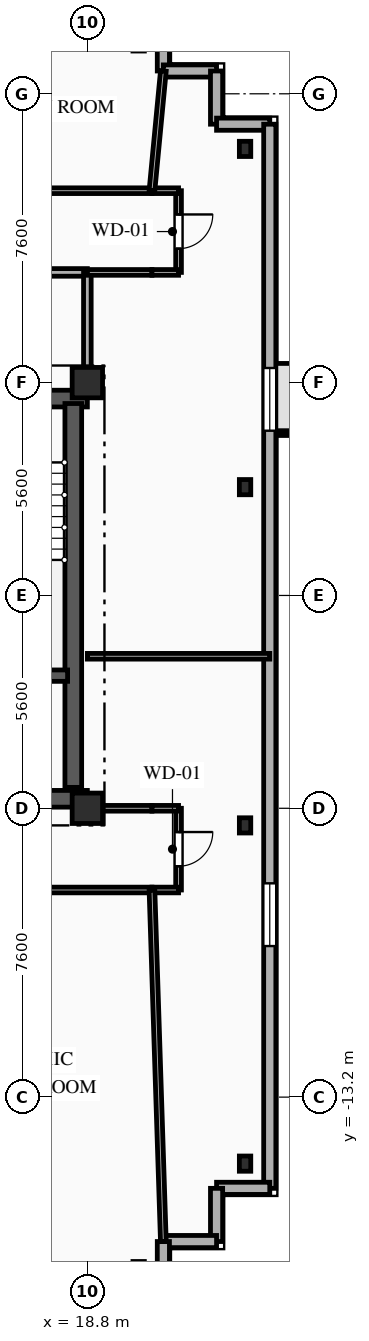
"""IFC4 building model, lengths in metres.
Left out: names, types, materials, properties, quantities, classifications, styles, units other than length and angle.
Written with IfcOpenShell. Run it as: python <this file> out.ifc"""

import sys

from ifc_helpers import new_model, si_unit, direction, frame, frame_2d, origin, origin_2d, place, context, subcontext, project, spatial, rectangle, i_section, extrude, element, fill, save


model = new_model("IFC4")
c1 = context("Model", 3, precision=1e-05, world=origin(), true_north=direction((0.0, 1.0)))
c2 = subcontext(c1, "Body", "Model", "MODEL_VIEW")
j1 = project(units=[si_unit("LENGTHUNIT", "METRE"), si_unit("PLANEANGLEUNIT", "RADIAN")], contexts=[c1])
p1 = place(None, origin())
s1 = spatial("IfcSite", under=j1, at=p1, CompositionType="ELEMENT")
p2 = place(p1, origin())
s2 = spatial("IfcBuilding", under=s1, at=p2, CompositionType="ELEMENT")
p3 = place(p2, frame((0.0, 0.0, 238.35)))
s3 = spatial("IfcBuildingStorey", under=s2, at=p3, CompositionType="ELEMENT", Elevation=238.35)
for number, where, z_axis, x_axis in (
    (1, (18.8, -5.6, 0.0), (0.0, 0.0, 1.0), (1.0, 0.0, 0.0)),
    (2, (18.8, 5.6, 0.0), (0.0, 0.0, 1.0), (1.0, 0.0, 0.0)),
):
    element("IfcColumn", number, at=place(p3, frame(where, z_axis=z_axis, x_axis=x_axis)), inside=s3, PredefinedType="COLUMN", context=c2, shape_type="SweptSolid", body=[
        extrude(rectangle(XDim=0.8, YDim=0.8, at=origin_2d()), origin(), (0.0, 0.0, 1.0), 3.35),
    ])
for number, where, z_axis, x_axis in (
    (3, (22.95, -14.95, 0.0), (0.0, 0.0, 1.0), (1.0, 0.0, 0.0)),
    (4, (22.95, -6.05, 0.0), (0.0, 0.0, 1.0), (1.0, 0.0, 0.0)),
    (5, (22.95, 2.85, 0.0), (0.0, 0.0, 1.0), (1.0, 0.0, 0.0)),
    (6, (22.95, 11.75, 0.0), (0.0, 0.0, 1.0), (1.0, 0.0, 0.0)),
):
    element("IfcColumn", number, at=place(p3, frame(where, z_axis=z_axis, x_axis=x_axis)), inside=s3, PredefinedType="COLUMN", context=c2, shape_type="SweptSolid", body=[
        extrude(i_section(OverallWidth=0.3, OverallDepth=0.4, WebThickness=0.013, FlangeThickness=0.024, FilletRadius=0.027, at=origin_2d()), origin(), (0.0, 0.0, 1.0), 3.35),
    ])
for number, where, z_axis, x_axis in (
    (7, (20.8, 15.2, 0.0), (0.0, 0.0, 1.0), (0.0, -1.0, 0.0)),
    (8, (20.8, 13.8, 0.0), (0.0, 0.0, 1.0), (1.0, 0.0, 0.0)),
):
    element("IfcWall", number, at=place(p3, frame(where, z_axis=z_axis, x_axis=x_axis)), inside=s3, PredefinedType="SOLIDWALL", context=c2, shape_type="SweptSolid", body=[
        extrude(rectangle(XDim=1.4, YDim=0.32, at=frame_2d((0.7, 0.0))), origin(), (0.0, 0.0, 1.0), 3.04),
    ])
for number, where, z_axis, x_axis in (
    (9, (22.2, 13.8, 0.0), (0.0, 0.0, 1.0), (0.0, -1.0, 0.0)),
    (10, (22.2, 12.4, 0.0), (0.0, 0.0, 1.0), (1.0, 0.0, 0.0)),
):
    element("IfcWall", number, at=place(p3, frame(where, z_axis=z_axis, x_axis=x_axis)), inside=s3, PredefinedType="SOLIDWALL", context=c2, shape_type="SweptSolid", body=[
        extrude(rectangle(XDim=1.4, YDim=0.32, at=frame_2d((0.7, 0.0))), origin(), (0.0, 0.0, 1.0), 3.04),
    ])
p4 = place(p3, frame((23.6, 12.4, 0.0), z_axis=(0.0, 0.0, 1.0), x_axis=(0.0, -1.0, 0.0)))
e11 = element("IfcWall", 11, at=p4, inside=s3, PredefinedType="SOLIDWALL", context=c2, shape_type="SweptSolid", body=[
    extrude(rectangle(XDim=28.0, YDim=0.32, at=frame_2d((14.0, 0.0))), origin(), (0.0, 0.0, 1.0), 3.04),
])
p5 = place(p4, frame((6.415, 0.0, 0.85)))
e12 = element("IfcOpeningElement", 12, at=p5, cuts=e11, PredefinedType="OPENING", context=c2, shape_type="SweptSolid", body=[
    extrude(rectangle(XDim=1.65, YDim=1.85, at=frame_2d((0.825, 0.925))), frame((0.0, 0.17, 0.0), z_axis=(0.0, -1.0, 0.0), x_axis=(1.0, 0.0, 0.0)), (0.0, 0.0, 1.0), 0.34),
])
p6 = place(p4, frame((19.975, 0.0, 0.85)))
e13 = element("IfcOpeningElement", 13, at=p6, cuts=e11, PredefinedType="OPENING", context=c2, shape_type="SweptSolid", body=[
    extrude(rectangle(XDim=1.65, YDim=1.85, at=frame_2d((0.825, 0.925))), frame((0.0, 0.17, 0.0), z_axis=(0.0, -1.0, 0.0), x_axis=(1.0, 0.0, 0.0)), (0.0, 0.0, 1.0), 0.34),
])
p7 = place(p3, frame((23.6, -15.6, 0.0), z_axis=(0.0, 0.0, 1.0), x_axis=(-1.0, 0.0, 0.0)))
e14 = element("IfcWall", 14, at=p7, inside=s3, PredefinedType="SOLIDWALL", context=c2, shape_type="SweptSolid", body=[
    extrude(rectangle(XDim=1.4, YDim=0.32, at=frame_2d((0.7, 0.0))), origin(), (0.0, 0.0, 1.0), 3.04),
])
for number, where, z_axis, x_axis in (
    (15, (22.2, -15.6, 0.0), (0.0, 0.0, 1.0), (0.0, -1.0, 0.0)),
    (16, (22.2, -17.0, 0.0), (0.0, 0.0, 1.0), (-1.0, 0.0, 0.0)),
    (17, (20.8, -17.0, 0.0), (0.0, 0.0, 1.0), (0.0, -1.0, 0.0)),
):
    element("IfcWall", number, at=place(p3, frame(where, z_axis=z_axis, x_axis=x_axis)), inside=s3, PredefinedType="SOLIDWALL", context=c2, shape_type="SweptSolid", body=[
        extrude(rectangle(XDim=1.4, YDim=0.32, at=frame_2d((0.7, 0.0))), origin(), (0.0, 0.0, 1.0), 3.04),
    ])
p8 = place(p3, frame((9.2, 5.18, 0.0), z_axis=(0.0, 0.0, 1.0), x_axis=(1.0, 0.0, 0.0)))
e18 = element("IfcWall", 18, at=p8, inside=s3, PredefinedType="SHEAR", context=c2, shape_type="SweptSolid", body=[
    extrude(rectangle(XDim=9.6, YDim=0.44, at=frame_2d((4.8, 0.0))), origin(), (0.0, 0.0, 1.0), 3.04),
])
p9 = place(p8, frame((6.95, 0.0, 0.0)))
e19 = element("IfcOpeningElement", 19, at=p9, cuts=e18, PredefinedType="OPENING", context=c2, shape_type="SweptSolid", body=[
    extrude(rectangle(XDim=1.1, YDim=2.15, at=frame_2d((0.55, 1.075))), frame((0.0, 0.23, 0.0), z_axis=(0.0, -1.0, 0.0), x_axis=(1.0, 0.0, 0.0)), (0.0, 0.0, 1.0), 0.46),
])
p10 = place(p8, frame((3.775, 0.0, 0.0)))
e20 = element("IfcOpeningElement", 20, at=p10, cuts=e18, PredefinedType="OPENING", context=c2, shape_type="SweptSolid", body=[
    extrude(rectangle(XDim=1.05, YDim=2.1, at=frame_2d((0.525, 1.05))), frame((0.0, 0.23, 0.0), z_axis=(0.0, -1.0, 0.0), x_axis=(1.0, 0.0, 0.0)), (0.0, 0.0, 1.0), 0.46),
])
p11 = place(p3, frame((9.2, -5.35, 0.0), z_axis=(0.0, 0.0, 1.0), x_axis=(1.0, 0.0, 0.0)))
e21 = element("IfcWall", 21, at=p11, inside=s3, PredefinedType="SHEAR", context=c2, shape_type="SweptSolid", body=[
    extrude(rectangle(XDim=9.6, YDim=0.44, at=frame_2d((4.8, 0.0))), origin(), (0.0, 0.0, 1.0), 3.04),
])
p12 = place(p11, frame((7.65, 0.0, 0.0)))
e22 = element("IfcOpeningElement", 22, at=p12, cuts=e21, PredefinedType="OPENING", context=c2, shape_type="SweptSolid", body=[
    extrude(rectangle(XDim=0.9, YDim=2.1, at=frame_2d((0.45, 1.05))), frame((0.0, 0.23, 0.0), z_axis=(0.0, -1.0, 0.0), x_axis=(1.0, 0.0, 0.0)), (0.0, 0.0, 1.0), 0.46),
])
p13 = place(p3, frame((18.43, -5.05, 0.0), z_axis=(0.0, 0.0, 1.0), x_axis=(0.0, 1.0, 0.0)))
e23 = element("IfcWall", 23, at=p13, inside=s3, PredefinedType="SHEAR", context=c2, shape_type="SweptSolid", body=[
    extrude(rectangle(XDim=10.1, YDim=0.44, at=frame_2d((5.05, 0.0))), origin(), (0.0, 0.0, 1.0), 3.04),
])
p14 = place(p3, frame((15.1, -2.11, 0.0), z_axis=(0.0, 0.0, 1.0), x_axis=(1.0, 0.0, 0.0)))
e24 = element("IfcWall", 24, at=p14, inside=s3, PredefinedType="SHEAR", context=c2, shape_type="SweptSolid", body=[
    extrude(rectangle(XDim=3.18, YDim=0.3, at=frame_2d((1.59, 0.0))), origin(), (0.0, 0.0, 1.0), 3.04),
])
p15 = place(p3, frame((18.8, 8.5, 0.0), z_axis=(0.0, 0.0, 1.0), x_axis=(-1.0, 0.0, 0.0)))
e25 = element("IfcWall", 25, at=p15, inside=s3, PredefinedType="PARTITIONING", context=c2, shape_type="SweptSolid", body=[
    extrude(rectangle(XDim=6.8, YDim=0.2, at=frame_2d((3.4, 0.0))), origin(), (0.0, 0.0, 1.0), 3.04),
])
p16 = place(p15, frame((3.985, 0.0, 0.0)))
e26 = element("IfcOpeningElement", 26, at=p16, cuts=e25, PredefinedType="OPENING", context=c2, shape_type="SweptSolid", body=[
    extrude(rectangle(XDim=1.1, YDim=2.15, at=frame_2d((0.55, 1.075))), frame((0.0, 0.11, 0.0), z_axis=(0.0, -1.0, 0.0), x_axis=(1.0, 0.0, 0.0)), (0.0, 0.0, 1.0), 0.22),
])
p17 = place(p3, frame((18.8, 5.6, 0.0), z_axis=(0.0, 0.0, 1.0), x_axis=(0.0, 1.0, 0.0)))
e27 = element("IfcWall", 27, at=p17, inside=s3, PredefinedType="PARTITIONING", context=c2, shape_type="SweptSolid", body=[
    extrude(rectangle(XDim=2.9, YDim=0.2, at=frame_2d((1.45, 0.0))), origin(), (0.0, 0.0, 1.0), 2.665),
])
p18 = place(p3, frame((21.2, 10.65, 0.0), z_axis=(0.0, 0.0, 1.0), x_axis=(0.0, -1.0, 0.0)))
e28 = element("IfcWall", 28, at=p18, inside=s3, PredefinedType="PARTITIONING", context=c2, shape_type="SweptSolid", body=[
    extrude(rectangle(XDim=2.15, YDim=0.15, at=frame_2d((1.075, 0.0))), origin(), (0.0, 0.0, 1.0), 3.04),
])
p19 = place(p18, frame((0.625, 0.0, 0.0)))
e29 = element("IfcOpeningElement", 29, at=p19, cuts=e28, PredefinedType="OPENING", context=c2, shape_type="SweptSolid", body=[
    extrude(rectangle(XDim=0.9, YDim=2.1, at=frame_2d((0.45, 1.05))), frame((0.0, 0.085, 0.0), z_axis=(0.0, -1.0, 0.0), x_axis=(1.0, 0.0, 0.0)), (0.0, 0.0, 1.0), 0.17),
])
p20 = place(p3, frame((20.5, 8.5, 0.0), z_axis=(0.0, 0.0, 1.0), x_axis=(-1.0, 0.0, 0.0)))
e30 = element("IfcWall", 30, at=p20, inside=s3, PredefinedType="PARTITIONING", context=c2, shape_type="SweptSolid", body=[
    extrude(rectangle(XDim=1.7, YDim=0.15, at=frame_2d((0.85, 0.0))), origin(), (0.0, 0.0, 1.0), 3.04),
])
for number, where, z_axis, x_axis in (
    (31, (20.5, 10.65, 0.0), (0.0, 0.0, 1.0), (1.0, 0.0, 0.0)),
    (32, (21.2, 8.5, 0.0), (0.0, 0.0, 1.0), (-1.0, 0.0, 0.0)),
):
    element("IfcWall", number, at=place(p3, frame(where, z_axis=z_axis, x_axis=x_axis)), inside=s3, PredefinedType="PARTITIONING", context=c2, shape_type="SweptSolid", body=[
        extrude(rectangle(XDim=0.7, YDim=0.15, at=frame_2d((0.35, 0.0))), origin(), (0.0, 0.0, 1.0), 3.04),
    ])
p21 = place(p3, frame((10.25, 10.65, 0.0), z_axis=(0.0, 0.0, 1.0), x_axis=(1.0, 0.0, 0.0)))
e33 = element("IfcWall", 33, at=p21, inside=s3, PredefinedType="PARTITIONING", context=c2, shape_type="SweptSolid", body=[
    extrude(rectangle(XDim=10.25, YDim=0.15, at=frame_2d((5.125, 0.0))), origin(), (0.0, 0.0, 1.0), 3.04),
])
p22 = place(p21, frame((5.605, 0.0, 0.0)))
e34 = element("IfcOpeningElement", 34, at=p22, cuts=e33, PredefinedType="OPENING", context=c2, shape_type="SweptSolid", body=[
    extrude(rectangle(XDim=1.05, YDim=2.15, at=frame_2d((0.525, 1.075))), frame((0.0, 0.085, 0.0), z_axis=(0.0, -1.0, 0.0), x_axis=(1.0, 0.0, 0.0)), (0.0, 0.0, 1.0), 0.17),
])
p23 = place(p3, frame((21.2, -5.6, 0.0), z_axis=(0.0, 0.0, 1.0), x_axis=(0.0, -1.0, 0.0)))
e35 = element("IfcWall", 35, at=p23, inside=s3, PredefinedType="PARTITIONING", context=c2, shape_type="SweptSolid", body=[
    extrude(rectangle(XDim=2.15, YDim=0.15, at=frame_2d((1.075, 0.0))), origin(), (0.0, 0.0, 1.0), 3.04),
])
p24 = place(p23, frame((0.625, 0.0, 0.0)))
e36 = element("IfcOpeningElement", 36, at=p24, cuts=e35, PredefinedType="OPENING", context=c2, shape_type="SweptSolid", body=[
    extrude(rectangle(XDim=0.9, YDim=2.1, at=frame_2d((0.45, 1.05))), frame((0.0, 0.085, 0.0), z_axis=(0.0, -1.0, 0.0), x_axis=(1.0, 0.0, 0.0)), (0.0, 0.0, 1.0), 0.17),
])
p25 = place(p3, frame((18.8, -5.6, 0.0), z_axis=(0.0, 0.0, 1.0), x_axis=(1.0, 0.0, 0.0)))
e37 = element("IfcWall", 37, at=p25, inside=s3, PredefinedType="PARTITIONING", context=c2, shape_type="SweptSolid", body=[
    extrude(rectangle(XDim=1.7, YDim=0.15, at=frame_2d((0.85, 0.0))), origin(), (0.0, 0.0, 1.0), 3.04),
])
for number, where, z_axis, x_axis in (
    (38, (20.5, -5.6, 0.0), (0.0, 0.0, 1.0), (1.0, 0.0, 0.0)),
    (39, (21.2, -7.75, 0.0), (0.0, 0.0, 1.0), (-1.0, 0.0, 0.0)),
):
    element("IfcWall", number, at=place(p3, frame(where, z_axis=z_axis, x_axis=x_axis)), inside=s3, PredefinedType="PARTITIONING", context=c2, shape_type="SweptSolid", body=[
        extrude(rectangle(XDim=0.7, YDim=0.15, at=frame_2d((0.35, 0.0))), origin(), (0.0, 0.0, 1.0), 3.04),
    ])
p26 = place(p3, frame((20.5, -7.75, 0.0), z_axis=(0.0, 0.0, 1.0), x_axis=(-1.0, 0.0, 0.0)))
e40 = element("IfcWall", 40, at=p26, inside=s3, PredefinedType="PARTITIONING", context=c2, shape_type="SweptSolid", body=[
    extrude(rectangle(XDim=6.833, YDim=0.15, at=frame_2d((3.417, 0.0))), origin(), (0.0, 0.0, 1.0), 3.04),
])
p27 = place(p26, frame((4.625, 0.0, 0.0)))
e41 = element("IfcOpeningElement", 41, at=p27, cuts=e40, PredefinedType="OPENING", context=c2, shape_type="SweptSolid", body=[
    extrude(rectangle(XDim=1.05, YDim=2.15, at=frame_2d((0.525, 1.075))), frame((0.0, 0.085, 0.0), z_axis=(0.0, -1.0, 0.0), x_axis=(1.0, 0.0, 0.0)), (0.0, 0.0, 1.0), 0.17),
])
p28 = place(p3, frame((18.8, -1.6, 0.0), z_axis=(0.0, 0.0, 1.0), x_axis=(1.0, 0.0, 0.0)))
e42 = element("IfcWall", 42, at=p28, inside=s3, PredefinedType="PARTITIONING", context=c2, shape_type="SweptSolid", body=[
    extrude(rectangle(XDim=4.8, YDim=0.15, at=frame_2d((2.4, 0.0))), origin(), (0.0, 0.0, 1.0), 3.04),
])
p29 = place(p3, frame((20.8, -17.0, 0.0), z_axis=(0.0, 0.0, 1.0), x_axis=(-0.032420659042, 0.99947431226, 0.0)))
e43 = element("IfcWall", 43, at=p29, inside=s3, PredefinedType="PARTITIONING", context=c2, shape_type="SweptSolid", body=[
    extrude(rectangle(XDim=9.255, YDim=0.15, at=frame_2d((4.627, 0.0))), origin(), (0.0, 0.0, 1.0), 3.04),
])
p30 = place(p3, frame((20.5, 10.65, 0.0), z_axis=(0.0, 0.0, 1.0), x_axis=(0.094820015289, 0.99549443228, 0.0)))
e44 = element("IfcWall", 44, at=p30, inside=s3, PredefinedType="PARTITIONING", context=c2, shape_type="SweptSolid", body=[
    extrude(rectangle(XDim=3.164, YDim=0.15, at=frame_2d((1.582, 0.0))), origin(), (0.0, 0.0, 1.0), 3.04),
])
p31 = place(p5, origin())
e45 = element("IfcWindow", 45, at=p31, inside=s3, PartitioningType="SINGLE_PANEL", PredefinedType="WINDOW", context=c2, shape_type="SweptSolid", body=[
    extrude(rectangle(XDim=1.65, YDim=1.85, at=frame_2d((0.825, 0.925))), frame((0.0, 0.03, 0.0), z_axis=(0.0, -1.0, 0.0), x_axis=(1.0, 0.0, 0.0)), (0.0, 0.0, 1.0), 0.06),
])
fill(e12, e45)
p32 = place(p6, origin())
e46 = element("IfcWindow", 46, at=p32, inside=s3, PartitioningType="SINGLE_PANEL", PredefinedType="WINDOW", context=c2, shape_type="SweptSolid", body=[
    extrude(rectangle(XDim=1.65, YDim=1.85, at=frame_2d((0.825, 0.925))), frame((0.0, 0.03, 0.0), z_axis=(0.0, -1.0, 0.0), x_axis=(1.0, 0.0, 0.0)), (0.0, 0.0, 1.0), 0.06),
])
fill(e13, e46)
p33 = place(p19, origin())
e47 = element("IfcDoor", 47, at=p33, inside=s3, OperationType="SINGLE_SWING_LEFT", PredefinedType="DOOR", context=c2, shape_type="SweptSolid", body=[
    extrude(rectangle(XDim=0.9, YDim=2.1, at=frame_2d((0.45, 1.05))), frame((0.0, 0.025, 0.0), z_axis=(0.0, -1.0, 0.0), x_axis=(1.0, 0.0, 0.0)), (0.0, 0.0, 1.0), 0.05),
])
fill(e29, e47)
p34 = place(p24, origin())
e48 = element("IfcDoor", 48, at=p34, inside=s3, OperationType="SINGLE_SWING_LEFT", PredefinedType="DOOR", context=c2, shape_type="SweptSolid", body=[
    extrude(rectangle(XDim=0.9, YDim=2.1, at=frame_2d((0.45, 1.05))), frame((0.0, 0.025, 0.0), z_axis=(0.0, -1.0, 0.0), x_axis=(1.0, 0.0, 0.0)), (0.0, 0.0, 1.0), 0.05),
])
fill(e36, e48)
save(model, sys.argv[1])
